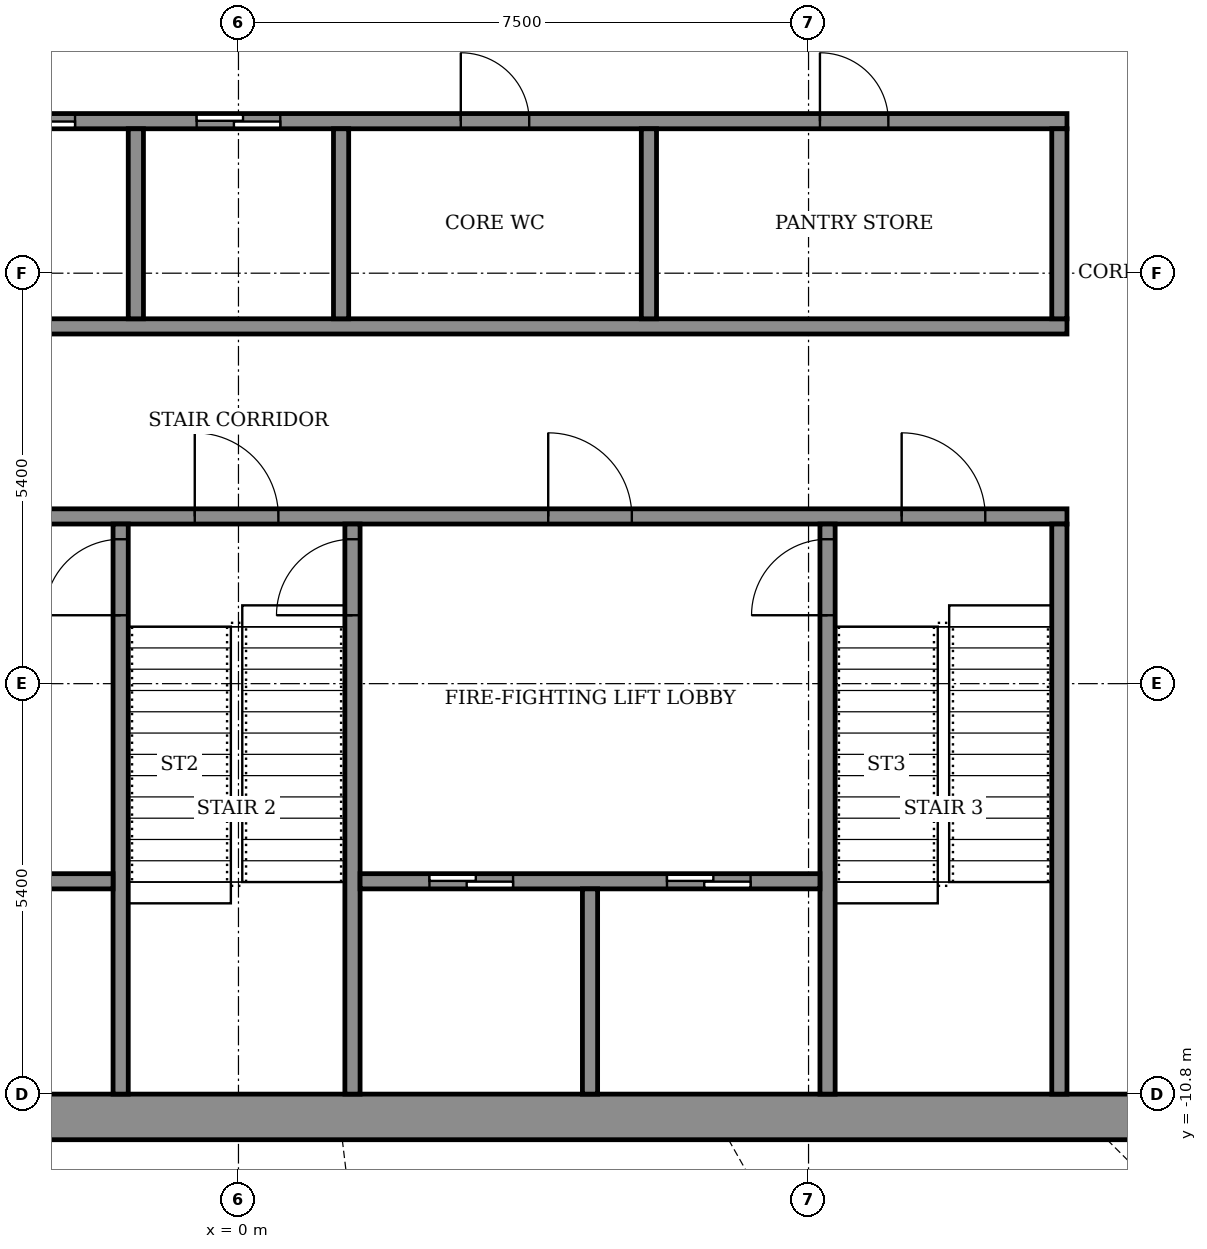
"""IFC4 building model, lengths in metres.
Left out: names, types, materials, properties, quantities, classifications, styles, units other than length and angle.
Written with IfcOpenShell. Run it as: python <this file> out.ifc"""

import sys

from ifc_helpers import new_model, si_unit, direction, frame, frame_2d, origin, place, context, subcontext, project, spatial, rectangle, extrude, element, fill, save


model = new_model("IFC4")
c1 = context("Model", 3, precision=1e-05, world=origin(), true_north=direction((0.0, 1.0)))
c2 = subcontext(c1, "Body", "Model", "MODEL_VIEW")
j1 = project(units=[si_unit("LENGTHUNIT", "METRE"), si_unit("PLANEANGLEUNIT", "RADIAN")], contexts=[c1])
p1 = place(None, origin())
s1 = spatial("IfcSite", under=j1, at=p1, CompositionType="ELEMENT")
p2 = place(p1, origin())
s2 = spatial("IfcBuilding", under=s1, at=p2, CompositionType="ELEMENT")
p3 = place(p2, frame((0.0, 0.0, 346.1)))
s3 = spatial("IfcBuildingStorey", under=s2, at=p3, CompositionType="ELEMENT", Elevation=346.1)
p4 = place(p3, frame((-14.4, -11.1, 0.0), z_axis=(0.0, 0.0, 1.0), x_axis=(1.0, 0.0, 0.0)))
e1 = element("IfcWall", 1, at=p4, inside=s3, PredefinedType="SHEAR", context=c2, shape_type="SweptSolid", body=[
    extrude(rectangle(XDim=28.8, YDim=0.6, at=frame_2d((14.4, 0.0))), origin(), (0.0, 0.0, 1.0), 4.6),
])
p5 = place(p3, frame((-10.9, -3.2, 0.0), z_axis=(0.0, 0.0, 1.0), x_axis=(1.0, 0.0, 0.0)))
e2 = element("IfcWall", 2, at=p5, inside=s3, PredefinedType="SHEAR", context=c2, shape_type="SweptSolid", body=[
    extrude(rectangle(XDim=21.8, YDim=0.2, at=frame_2d((10.9, 0.0))), origin(), (0.0, 0.0, 1.0), 4.05),
])
p6 = place(p5, frame((1.075, 0.0, 0.0)))
e3 = element("IfcOpeningElement", 3, at=p6, cuts=e2, PredefinedType="OPENING", context=c2, shape_type="SweptSolid", body=[
    extrude(rectangle(XDim=1.1, YDim=2.1, at=frame_2d((0.55, 1.05))), frame((0.0, 0.11, 0.0), z_axis=(0.0, -1.0, 0.0), x_axis=(1.0, 0.0, 0.0)), (0.0, 0.0, 1.0), 0.22),
])
p7 = place(p5, frame((10.325, 0.0, 0.0)))
e4 = element("IfcOpeningElement", 4, at=p7, cuts=e2, PredefinedType="OPENING", context=c2, shape_type="SweptSolid", body=[
    extrude(rectangle(XDim=1.1, YDim=2.1, at=frame_2d((0.55, 1.05))), frame((0.0, 0.11, 0.0), z_axis=(0.0, -1.0, 0.0), x_axis=(1.0, 0.0, 0.0)), (0.0, 0.0, 1.0), 0.22),
])
p8 = place(p5, frame((19.625, 0.0, 0.0)))
e5 = element("IfcOpeningElement", 5, at=p8, cuts=e2, PredefinedType="OPENING", context=c2, shape_type="SweptSolid", body=[
    extrude(rectangle(XDim=1.1, YDim=2.1, at=frame_2d((0.55, 1.05))), frame((0.0, 0.11, 0.0), z_axis=(0.0, -1.0, 0.0), x_axis=(1.0, 0.0, 0.0)), (0.0, 0.0, 1.0), 0.22),
])
p9 = place(p5, frame((5.7, 0.0, 0.0)))
e6 = element("IfcOpeningElement", 6, at=p9, cuts=e2, PredefinedType="OPENING", context=c2, shape_type="SweptSolid", body=[
    extrude(rectangle(XDim=1.1, YDim=2.1, at=frame_2d((0.55, 1.05))), frame((0.0, 0.11, 0.0), z_axis=(0.0, -1.0, 0.0), x_axis=(1.0, 0.0, 0.0)), (0.0, 0.0, 1.0), 0.22),
])
p10 = place(p5, frame((14.975, 0.0, 0.0)))
e7 = element("IfcOpeningElement", 7, at=p10, cuts=e2, PredefinedType="OPENING", context=c2, shape_type="SweptSolid", body=[
    extrude(rectangle(XDim=1.1, YDim=2.1, at=frame_2d((0.55, 1.05))), frame((0.0, 0.11, 0.0), z_axis=(0.0, -1.0, 0.0), x_axis=(1.0, 0.0, 0.0)), (0.0, 0.0, 1.0), 0.22),
])
p11 = place(p3, frame((-10.9, -0.7, 0.0), z_axis=(0.0, 0.0, 1.0), x_axis=(1.0, 0.0, 0.0)))
e8 = element("IfcWall", 8, at=p11, inside=s3, PredefinedType="SHEAR", context=c2, shape_type="SweptSolid", body=[
    extrude(rectangle(XDim=21.8, YDim=0.2, at=frame_2d((10.9, 0.0))), origin(), (0.0, 0.0, 1.0), 4.05),
])
p12 = place(p3, frame((-10.9, 2.0, 0.0), z_axis=(0.0, 0.0, 1.0), x_axis=(1.0, 0.0, 0.0)))
e9 = element("IfcWall", 9, at=p12, inside=s3, PredefinedType="SHEAR", context=c2, shape_type="SweptSolid", body=[
    extrude(rectangle(XDim=21.8, YDim=0.2, at=frame_2d((10.9, 0.0))), origin(), (0.0, 0.0, 1.0), 4.05),
])
p13 = place(p12, frame((4.95, 0.0, 0.0)))
e10 = element("IfcOpeningElement", 10, at=p13, cuts=e9, PredefinedType="OPENING", context=c2, shape_type="SweptSolid", body=[
    extrude(rectangle(XDim=1.1, YDim=2.1, at=frame_2d((0.55, 1.05))), frame((0.0, 0.11, 0.0), z_axis=(0.0, -1.0, 0.0), x_axis=(1.0, 0.0, 0.0)), (0.0, 0.0, 1.0), 0.22),
])
p14 = place(p12, frame((7.65, 0.0, 0.0)))
e11 = element("IfcOpeningElement", 11, at=p14, cuts=e9, PredefinedType="OPENING", context=c2, shape_type="SweptSolid", body=[
    extrude(rectangle(XDim=1.1, YDim=2.1, at=frame_2d((0.55, 1.05))), frame((0.0, 0.11, 0.0), z_axis=(0.0, -1.0, 0.0), x_axis=(1.0, 0.0, 0.0)), (0.0, 0.0, 1.0), 0.22),
])
p15 = place(p12, frame((10.35, 0.0, 0.0)))
e12 = element("IfcOpeningElement", 12, at=p15, cuts=e9, PredefinedType="OPENING", context=c2, shape_type="SweptSolid", body=[
    extrude(rectangle(XDim=1.1, YDim=2.1, at=frame_2d((0.55, 1.05))), frame((0.0, 0.11, 0.0), z_axis=(0.0, -1.0, 0.0), x_axis=(1.0, 0.0, 0.0)), (0.0, 0.0, 1.0), 0.22),
])
p16 = place(p12, frame((1.675, 0.0, 0.0)))
e13 = element("IfcOpeningElement", 13, at=p16, cuts=e9, PredefinedType="OPENING", context=c2, shape_type="SweptSolid", body=[
    extrude(rectangle(XDim=0.9, YDim=2.1, at=frame_2d((0.45, 1.05))), frame((0.0, 0.11, 0.0), z_axis=(0.0, -1.0, 0.0), x_axis=(1.0, 0.0, 0.0)), (0.0, 0.0, 1.0), 0.22),
])
p17 = place(p12, frame((13.825, 0.0, 0.0)))
e14 = element("IfcOpeningElement", 14, at=p17, cuts=e9, PredefinedType="OPENING", context=c2, shape_type="SweptSolid", body=[
    extrude(rectangle(XDim=0.9, YDim=2.1, at=frame_2d((0.45, 1.05))), frame((0.0, 0.11, 0.0), z_axis=(0.0, -1.0, 0.0), x_axis=(1.0, 0.0, 0.0)), (0.0, 0.0, 1.0), 0.22),
])
p18 = place(p12, frame((18.55, 0.0, 0.0)))
e15 = element("IfcOpeningElement", 15, at=p18, cuts=e9, PredefinedType="OPENING", context=c2, shape_type="SweptSolid", body=[
    extrude(rectangle(XDim=0.9, YDim=2.1, at=frame_2d((0.45, 1.05))), frame((0.0, 0.11, 0.0), z_axis=(0.0, -1.0, 0.0), x_axis=(1.0, 0.0, 0.0)), (0.0, 0.0, 1.0), 0.22),
])
p19 = place(p3, frame((-1.55, -10.8, 0.0), z_axis=(0.0, 0.0, 1.0), x_axis=(0.0, 1.0, 0.0)))
e16 = element("IfcWall", 16, at=p19, inside=s3, PredefinedType="SHEAR", context=c2, shape_type="SweptSolid", body=[
    extrude(rectangle(XDim=7.5, YDim=0.2, at=frame_2d((3.75, 0.0))), origin(), (0.0, 0.0, 1.0), 4.05),
])
p20 = place(p19, frame((6.3, 0.0, 0.0)))
e17 = element("IfcOpeningElement", 17, at=p20, cuts=e16, PredefinedType="OPENING", context=c2, shape_type="SweptSolid", body=[
    extrude(rectangle(XDim=1.0, YDim=2.1, at=frame_2d((0.5, 1.05))), frame((0.0, 0.11, 0.0), z_axis=(0.0, -1.0, 0.0), x_axis=(1.0, 0.0, 0.0)), (0.0, 0.0, 1.0), 0.22),
])
p21 = place(p3, frame((1.5, -10.8, 0.0), z_axis=(0.0, 0.0, 1.0), x_axis=(0.0, 1.0, 0.0)))
e18 = element("IfcWall", 18, at=p21, inside=s3, PredefinedType="SHEAR", context=c2, shape_type="SweptSolid", body=[
    extrude(rectangle(XDim=7.5, YDim=0.2, at=frame_2d((3.75, 0.0))), origin(), (0.0, 0.0, 1.0), 4.05),
])
p22 = place(p21, frame((6.3, 0.0, 0.0)))
e19 = element("IfcOpeningElement", 19, at=p22, cuts=e18, PredefinedType="OPENING", context=c2, shape_type="SweptSolid", body=[
    extrude(rectangle(XDim=1.0, YDim=2.1, at=frame_2d((0.5, 1.05))), frame((0.0, 0.11, 0.0), z_axis=(0.0, -1.0, 0.0), x_axis=(1.0, 0.0, 0.0)), (0.0, 0.0, 1.0), 0.22),
])
p23 = place(p3, frame((7.75, -10.8, 0.0), z_axis=(0.0, 0.0, 1.0), x_axis=(0.0, 1.0, 0.0)))
e20 = element("IfcWall", 20, at=p23, inside=s3, PredefinedType="SHEAR", context=c2, shape_type="SweptSolid", body=[
    extrude(rectangle(XDim=7.5, YDim=0.2, at=frame_2d((3.75, 0.0))), origin(), (0.0, 0.0, 1.0), 4.05),
])
p24 = place(p23, frame((6.3, 0.0, 0.0)))
e21 = element("IfcOpeningElement", 21, at=p24, cuts=e20, PredefinedType="OPENING", context=c2, shape_type="SweptSolid", body=[
    extrude(rectangle(XDim=1.0, YDim=2.1, at=frame_2d((0.5, 1.05))), frame((0.0, 0.11, 0.0), z_axis=(0.0, -1.0, 0.0), x_axis=(1.0, 0.0, 0.0)), (0.0, 0.0, 1.0), 0.22),
])
p25 = place(p3, frame((10.8, -10.8, 0.0), z_axis=(0.0, 0.0, 1.0), x_axis=(0.0, 1.0, 0.0)))
e22 = element("IfcWall", 22, at=p25, inside=s3, PredefinedType="SHEAR", context=c2, shape_type="SweptSolid", body=[
    extrude(rectangle(XDim=7.5, YDim=0.2, at=frame_2d((3.75, 0.0))), origin(), (0.0, 0.0, 1.0), 4.05),
])
p26 = place(p3, frame((-7.65, -8.0, 0.0), z_axis=(0.0, 0.0, 1.0), x_axis=(1.0, 0.0, 0.0)))
e23 = element("IfcWall", 23, at=p26, inside=s3, PredefinedType="SHEAR", context=c2, shape_type="SweptSolid", body=[
    extrude(rectangle(XDim=6.0, YDim=0.2, at=frame_2d((3.0, 0.0))), origin(), (0.0, 0.0, 1.0), 4.05),
])
p27 = place(p26, frame((0.9, 0.0, 0.0)))
e24 = element("IfcOpeningElement", 24, at=p27, cuts=e23, PredefinedType="OPENING", context=c2, shape_type="SweptSolid", body=[
    extrude(rectangle(XDim=1.1, YDim=2.1, at=frame_2d((0.55, 1.05))), frame((0.0, 0.11, 0.0), z_axis=(0.0, -1.0, 0.0), x_axis=(1.0, 0.0, 0.0)), (0.0, 0.0, 1.0), 0.22),
])
p28 = place(p26, frame((4.0, 0.0, 0.0)))
e25 = element("IfcOpeningElement", 25, at=p28, cuts=e23, PredefinedType="OPENING", context=c2, shape_type="SweptSolid", body=[
    extrude(rectangle(XDim=1.1, YDim=2.1, at=frame_2d((0.55, 1.05))), frame((0.0, 0.11, 0.0), z_axis=(0.0, -1.0, 0.0), x_axis=(1.0, 0.0, 0.0)), (0.0, 0.0, 1.0), 0.22),
])
p29 = place(p3, frame((1.6, -8.0, 0.0), z_axis=(0.0, 0.0, 1.0), x_axis=(1.0, 0.0, 0.0)))
e26 = element("IfcWall", 26, at=p29, inside=s3, PredefinedType="SHEAR", context=c2, shape_type="SweptSolid", body=[
    extrude(rectangle(XDim=6.05, YDim=0.2, at=frame_2d((3.025, 0.0))), origin(), (0.0, 0.0, 1.0), 4.05),
])
p30 = place(p29, frame((0.913, 0.0, 0.0)))
e27 = element("IfcOpeningElement", 27, at=p30, cuts=e26, PredefinedType="OPENING", context=c2, shape_type="SweptSolid", body=[
    extrude(rectangle(XDim=1.1, YDim=2.1, at=frame_2d((0.55, 1.05))), frame((0.0, 0.11, 0.0), z_axis=(0.0, -1.0, 0.0), x_axis=(1.0, 0.0, 0.0)), (0.0, 0.0, 1.0), 0.22),
])
p31 = place(p29, frame((4.038, 0.0, 0.0)))
e28 = element("IfcOpeningElement", 28, at=p31, cuts=e26, PredefinedType="OPENING", context=c2, shape_type="SweptSolid", body=[
    extrude(rectangle(XDim=1.1, YDim=2.1, at=frame_2d((0.55, 1.05))), frame((0.0, 0.11, 0.0), z_axis=(0.0, -1.0, 0.0), x_axis=(1.0, 0.0, 0.0)), (0.0, 0.0, 1.0), 0.22),
])
p32 = place(p3, frame((4.625, -10.8, 0.0), z_axis=(0.0, 0.0, 1.0), x_axis=(0.0, 1.0, 0.0)))
e29 = element("IfcWall", 29, at=p32, inside=s3, PredefinedType="SHEAR", context=c2, shape_type="SweptSolid", body=[
    extrude(rectangle(XDim=2.7, YDim=0.2, at=frame_2d((1.35, 0.0))), origin(), (0.0, 0.0, 1.0), 4.05),
])
for number, where, z_axis, x_axis in (
    (30, (-1.35, -0.6, 0.0), (0.0, 0.0, 1.0), (0.0, 1.0, 0.0)),
    (31, (1.35, -0.6, 0.0), (0.0, 0.0, 1.0), (0.0, 1.0, 0.0)),
):
    element("IfcWall", number, at=place(p3, frame(where, z_axis=z_axis, x_axis=x_axis)), inside=s3, PredefinedType="SHEAR", context=c2, shape_type="SweptSolid", body=[
        extrude(rectangle(XDim=2.5, YDim=0.2, at=frame_2d((1.25, 0.0))), origin(), (0.0, 0.0, 1.0), 4.05),
    ])
for number, where, z_axis, x_axis in (
    (32, (5.4, -0.6, 0.0), (0.0, 0.0, 1.0), (0.0, 1.0, 0.0)),
    (33, (10.8, -0.6, 0.0), (0.0, 0.0, 1.0), (0.0, 1.0, 0.0)),
):
    element("IfcWall", number, at=place(p3, frame(where, z_axis=z_axis, x_axis=x_axis)), inside=s3, PredefinedType="STANDARD", context=c2, shape_type="SweptSolid", body=[
        extrude(rectangle(XDim=2.5, YDim=0.2, at=frame_2d((1.25, 0.0))), origin(), (0.0, 0.0, 1.0), 4.05),
    ])
p33 = place(p14, origin())
e34 = element("IfcDoor", 34, at=p33, inside=s3, OperationType="SLIDING_TO_LEFT", PredefinedType="DOOR", context=c2, shape_type="SweptSolid", body=[
    extrude(rectangle(XDim=1.1, YDim=2.1, at=frame_2d((0.55, 1.05))), frame((0.0, 0.025, 0.0), z_axis=(0.0, -1.0, 0.0), x_axis=(1.0, 0.0, 0.0)), (0.0, 0.0, 1.0), 0.05),
])
fill(e11, e34)
p34 = place(p15, origin())
e35 = element("IfcDoor", 35, at=p34, inside=s3, OperationType="SLIDING_TO_LEFT", PredefinedType="DOOR", context=c2, shape_type="SweptSolid", body=[
    extrude(rectangle(XDim=1.1, YDim=2.1, at=frame_2d((0.55, 1.05))), frame((0.0, 0.025, 0.0), z_axis=(0.0, -1.0, 0.0), x_axis=(1.0, 0.0, 0.0)), (0.0, 0.0, 1.0), 0.05),
])
fill(e12, e35)
p35 = place(p17, origin())
e36 = element("IfcDoor", 36, at=p35, inside=s3, OperationType="SINGLE_SWING_RIGHT", PredefinedType="DOOR", context=c2, shape_type="SweptSolid", body=[
    extrude(rectangle(XDim=0.9, YDim=2.1, at=frame_2d((0.45, 1.05))), frame((0.0, 0.025, 0.0), z_axis=(0.0, -1.0, 0.0), x_axis=(1.0, 0.0, 0.0)), (0.0, 0.0, 1.0), 0.05),
])
fill(e14, e36)
p36 = place(p18, origin())
e37 = element("IfcDoor", 37, at=p36, inside=s3, OperationType="SINGLE_SWING_RIGHT", PredefinedType="DOOR", context=c2, shape_type="SweptSolid", body=[
    extrude(rectangle(XDim=0.9, YDim=2.1, at=frame_2d((0.45, 1.05))), frame((0.0, 0.025, 0.0), z_axis=(0.0, -1.0, 0.0), x_axis=(1.0, 0.0, 0.0)), (0.0, 0.0, 1.0), 0.05),
])
fill(e15, e37)
p37 = place(p30, origin())
e38 = element("IfcDoor", 38, at=p37, inside=s3, OperationType="SLIDING_TO_LEFT", PredefinedType="DOOR", context=c2, shape_type="SweptSolid", body=[
    extrude(rectangle(XDim=1.1, YDim=2.1, at=frame_2d((0.55, 1.05))), frame((0.0, 0.025, 0.0), z_axis=(0.0, -1.0, 0.0), x_axis=(1.0, 0.0, 0.0)), (0.0, 0.0, 1.0), 0.05),
])
fill(e27, e38)
p38 = place(p31, origin())
e39 = element("IfcDoor", 39, at=p38, inside=s3, OperationType="SLIDING_TO_LEFT", PredefinedType="DOOR", context=c2, shape_type="SweptSolid", body=[
    extrude(rectangle(XDim=1.1, YDim=2.1, at=frame_2d((0.55, 1.05))), frame((0.0, 0.025, 0.0), z_axis=(0.0, -1.0, 0.0), x_axis=(1.0, 0.0, 0.0)), (0.0, 0.0, 1.0), 0.05),
])
fill(e28, e39)
p39 = place(p7, origin())
e40 = element("IfcDoor", 40, at=p39, inside=s3, OperationType="SINGLE_SWING_RIGHT", PredefinedType="DOOR", context=c2, shape_type="SweptSolid", body=[
    extrude(rectangle(XDim=1.1, YDim=2.1, at=frame_2d((0.55, 1.05))), frame((0.0, 0.025, 0.0), z_axis=(0.0, -1.0, 0.0), x_axis=(1.0, 0.0, 0.0)), (0.0, 0.0, 1.0), 0.05),
])
fill(e4, e40)
p40 = place(p8, origin())
e41 = element("IfcDoor", 41, at=p40, inside=s3, OperationType="SINGLE_SWING_RIGHT", PredefinedType="DOOR", context=c2, shape_type="SweptSolid", body=[
    extrude(rectangle(XDim=1.1, YDim=2.1, at=frame_2d((0.55, 1.05))), frame((0.0, 0.025, 0.0), z_axis=(0.0, -1.0, 0.0), x_axis=(1.0, 0.0, 0.0)), (0.0, 0.0, 1.0), 0.05),
])
fill(e5, e41)
p41 = place(p10, origin())
e42 = element("IfcDoor", 42, at=p41, inside=s3, OperationType="SINGLE_SWING_LEFT", PredefinedType="DOOR", context=c2, shape_type="SweptSolid", body=[
    extrude(rectangle(XDim=1.1, YDim=2.1, at=frame_2d((0.55, 1.05))), frame((0.0, 0.025, 0.0), z_axis=(0.0, -1.0, 0.0), x_axis=(1.0, 0.0, 0.0)), (0.0, 0.0, 1.0), 0.05),
])
fill(e7, e42)
p42 = place(p20, origin())
e43 = element("IfcDoor", 43, at=p42, inside=s3, OperationType="SINGLE_SWING_RIGHT", PredefinedType="DOOR", context=c2, shape_type="SweptSolid", body=[
    extrude(rectangle(XDim=1.0, YDim=2.1, at=frame_2d((0.5, 1.05))), frame((0.0, 0.025, 0.0), z_axis=(0.0, -1.0, 0.0), x_axis=(1.0, 0.0, 0.0)), (0.0, 0.0, 1.0), 0.05),
])
fill(e17, e43)
p43 = place(p22, origin())
e44 = element("IfcDoor", 44, at=p43, inside=s3, OperationType="SINGLE_SWING_RIGHT", PredefinedType="DOOR", context=c2, shape_type="SweptSolid", body=[
    extrude(rectangle(XDim=1.0, YDim=2.1, at=frame_2d((0.5, 1.05))), frame((0.0, 0.025, 0.0), z_axis=(0.0, -1.0, 0.0), x_axis=(1.0, 0.0, 0.0)), (0.0, 0.0, 1.0), 0.05),
])
fill(e19, e44)
p44 = place(p24, origin())
e45 = element("IfcDoor", 45, at=p44, inside=s3, OperationType="SINGLE_SWING_RIGHT", PredefinedType="DOOR", context=c2, shape_type="SweptSolid", body=[
    extrude(rectangle(XDim=1.0, YDim=2.1, at=frame_2d((0.5, 1.05))), frame((0.0, 0.025, 0.0), z_axis=(0.0, -1.0, 0.0), x_axis=(1.0, 0.0, 0.0)), (0.0, 0.0, 1.0), 0.05),
])
fill(e21, e45)
save(model, sys.argv[1])
